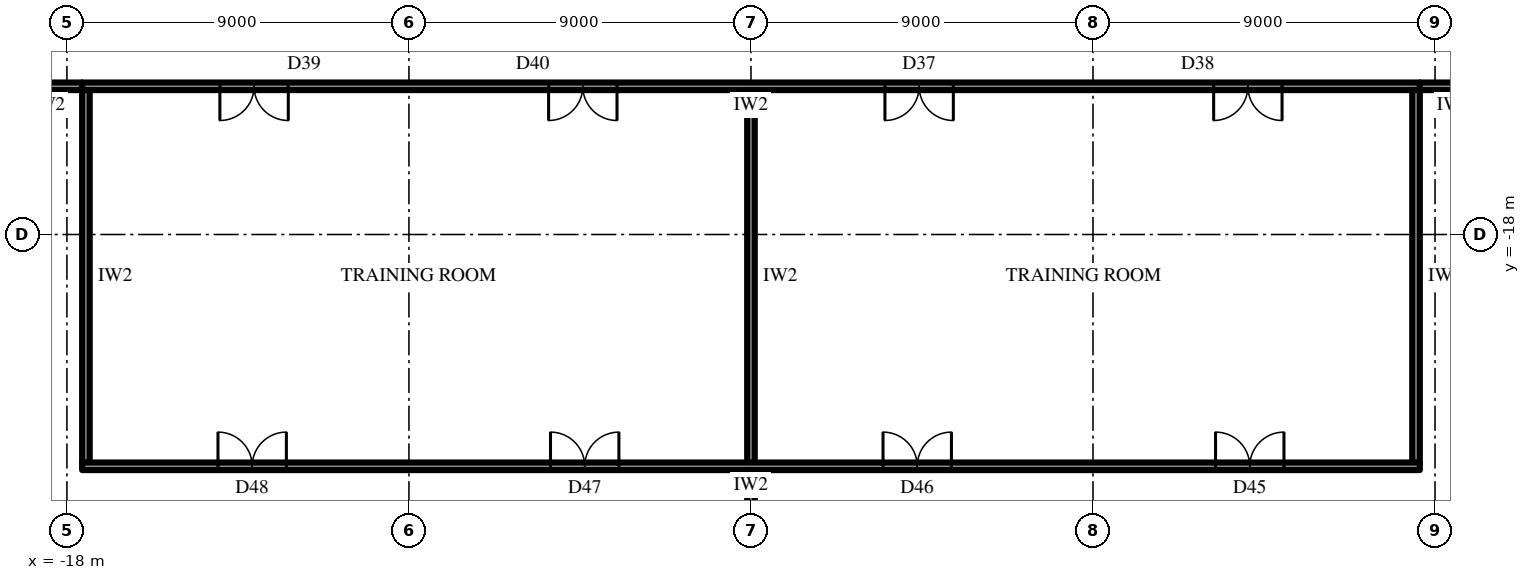
"""IFC4 building model, lengths in metres.
Left out: names, types, materials, properties, quantities, classifications, styles, units other than length and angle.
Written with IfcOpenShell. Run it as: python <this file> out.ifc"""

import sys

from ifc_helpers import new_model, si_unit, direction, frame, frame_2d, origin, place, context, subcontext, project, spatial, rectangle, extrude, element, fill, save


model = new_model("IFC4")
c1 = context("Model", 3, precision=1e-05, world=origin(), true_north=direction((0.0, 1.0)))
c2 = subcontext(c1, "Body", "Model", "MODEL_VIEW")
j1 = project(units=[si_unit("LENGTHUNIT", "METRE"), si_unit("PLANEANGLEUNIT", "RADIAN")], contexts=[c1])
p1 = place(None, origin())
s1 = spatial("IfcSite", under=j1, at=p1, CompositionType="ELEMENT")
p2 = place(p1, origin())
s2 = spatial("IfcBuilding", under=s1, at=p2, CompositionType="ELEMENT")
p3 = place(p2, frame((0.0, 0.0, 13.0)))
s3 = spatial("IfcBuildingStorey", under=s2, at=p3, CompositionType="ELEMENT", Elevation=13.0)
p4 = place(p3, frame((17.6, -14.1, 0.0), z_axis=(0.0, 0.0, 1.0), x_axis=(-1.0, 0.0, 0.0)))
e1 = element("IfcWall", 1, at=p4, inside=s3, PredefinedType="PARTITIONING", context=c2, shape_type="SweptSolid", body=[
    extrude(rectangle(XDim=35.2, YDim=0.2, at=frame_2d((17.6, 0.0))), origin(), (0.0, 0.0, 1.0), 5.15),
])
p5 = place(p4, frame((12.275, 0.0, 0.0)))
e2 = element("IfcOpeningElement", 2, at=p5, cuts=e1, PredefinedType="OPENING", context=c2, shape_type="SweptSolid", body=[
    extrude(rectangle(XDim=1.8, YDim=2.4, at=frame_2d((0.9, 1.2))), frame((0.0, 0.11, 0.0), z_axis=(0.0, -1.0, 0.0), x_axis=(1.0, 0.0, 0.0)), (0.0, 0.0, 1.0), 0.22),
])
p6 = place(p4, frame((3.625, 0.0, 0.0)))
e3 = element("IfcOpeningElement", 3, at=p6, cuts=e1, PredefinedType="OPENING", context=c2, shape_type="SweptSolid", body=[
    extrude(rectangle(XDim=1.8, YDim=2.4, at=frame_2d((0.9, 1.2))), frame((0.0, 0.11, 0.0), z_axis=(0.0, -1.0, 0.0), x_axis=(1.0, 0.0, 0.0)), (0.0, 0.0, 1.0), 0.22),
])
p7 = place(p4, frame((29.775, 0.0, 0.0)))
e4 = element("IfcOpeningElement", 4, at=p7, cuts=e1, PredefinedType="OPENING", context=c2, shape_type="SweptSolid", body=[
    extrude(rectangle(XDim=1.8, YDim=2.4, at=frame_2d((0.9, 1.2))), frame((0.0, 0.11, 0.0), z_axis=(0.0, -1.0, 0.0), x_axis=(1.0, 0.0, 0.0)), (0.0, 0.0, 1.0), 0.22),
])
p8 = place(p4, frame((21.125, 0.0, 0.0)))
e5 = element("IfcOpeningElement", 5, at=p8, cuts=e1, PredefinedType="OPENING", context=c2, shape_type="SweptSolid", body=[
    extrude(rectangle(XDim=1.8, YDim=2.4, at=frame_2d((0.9, 1.2))), frame((0.0, 0.11, 0.0), z_axis=(0.0, -1.0, 0.0), x_axis=(1.0, 0.0, 0.0)), (0.0, 0.0, 1.0), 0.22),
])
p9 = place(p3, frame((17.5, -14.2, 0.0), z_axis=(0.0, 0.0, 1.0), x_axis=(0.0, -1.0, 0.0)))
e6 = element("IfcWall", 6, at=p9, inside=s3, PredefinedType="PARTITIONING", context=c2, shape_type="SweptSolid", body=[
    extrude(rectangle(XDim=9.8, YDim=0.2, at=frame_2d((4.9, 0.0))), origin(), (0.0, 0.0, 1.0), 5.15),
])
p10 = place(p3, frame((0.0, -14.2, 0.0), z_axis=(0.0, 0.0, 1.0), x_axis=(0.0, -1.0, 0.0)))
e7 = element("IfcWall", 7, at=p10, inside=s3, PredefinedType="PARTITIONING", context=c2, shape_type="SweptSolid", body=[
    extrude(rectangle(XDim=9.8, YDim=0.2, at=frame_2d((4.9, 0.0))), origin(), (0.0, 0.0, 1.0), 4.094),
])
p11 = place(p3, frame((-17.5, -14.2, 0.0), z_axis=(0.0, 0.0, 1.0), x_axis=(0.0, -1.0, 0.0)))
e8 = element("IfcWall", 8, at=p11, inside=s3, PredefinedType="PARTITIONING", context=c2, shape_type="SweptSolid", body=[
    extrude(rectangle(XDim=9.8, YDim=0.2, at=frame_2d((4.9, 0.0))), origin(), (0.0, 0.0, 1.0), 5.15),
])
p12 = place(p3, frame((17.6, -24.1, 0.0), z_axis=(0.0, 0.0, 1.0), x_axis=(-1.0, 0.0, 0.0)))
e9 = element("IfcWall", 9, at=p12, inside=s3, PredefinedType="PARTITIONING", context=c2, shape_type="SweptSolid", body=[
    extrude(rectangle(XDim=35.2, YDim=0.2, at=frame_2d((17.6, 0.0))), origin(), (0.0, 0.0, 1.0), 5.15),
])
p13 = place(p12, frame((3.575, 0.0, 0.0)))
e10 = element("IfcOpeningElement", 10, at=p13, cuts=e9, PredefinedType="OPENING", context=c2, shape_type="SweptSolid", body=[
    extrude(rectangle(XDim=1.8, YDim=2.4, at=frame_2d((0.9, 1.2))), frame((0.0, 0.11, 0.0), z_axis=(0.0, -1.0, 0.0), x_axis=(1.0, 0.0, 0.0)), (0.0, 0.0, 1.0), 0.22),
])
p14 = place(p12, frame((12.325, 0.0, 0.0)))
e11 = element("IfcOpeningElement", 11, at=p14, cuts=e9, PredefinedType="OPENING", context=c2, shape_type="SweptSolid", body=[
    extrude(rectangle(XDim=1.8, YDim=2.4, at=frame_2d((0.9, 1.2))), frame((0.0, 0.11, 0.0), z_axis=(0.0, -1.0, 0.0), x_axis=(1.0, 0.0, 0.0)), (0.0, 0.0, 1.0), 0.22),
])
p15 = place(p12, frame((21.075, 0.0, 0.0)))
e12 = element("IfcOpeningElement", 12, at=p15, cuts=e9, PredefinedType="OPENING", context=c2, shape_type="SweptSolid", body=[
    extrude(rectangle(XDim=1.8, YDim=2.4, at=frame_2d((0.9, 1.2))), frame((0.0, 0.11, 0.0), z_axis=(0.0, -1.0, 0.0), x_axis=(1.0, 0.0, 0.0)), (0.0, 0.0, 1.0), 0.22),
])
p16 = place(p12, frame((29.825, 0.0, 0.0)))
e13 = element("IfcOpeningElement", 13, at=p16, cuts=e9, PredefinedType="OPENING", context=c2, shape_type="SweptSolid", body=[
    extrude(rectangle(XDim=1.8, YDim=2.4, at=frame_2d((0.9, 1.2))), frame((0.0, 0.11, 0.0), z_axis=(0.0, -1.0, 0.0), x_axis=(1.0, 0.0, 0.0)), (0.0, 0.0, 1.0), 0.22),
])
for number, where, z_axis, x_axis in (
    (14, (-17.6, -14.1, 0.0), (0.0, 0.0, 1.0), (-1.0, 0.0, 0.0)),
    (15, (19.4, -14.1, 0.0), (0.0, 0.0, 1.0), (-1.0, 0.0, 0.0)),
):
    element("IfcWall", number, at=place(p3, frame(where, z_axis=z_axis, x_axis=x_axis)), inside=s3, PredefinedType="PARTITIONING", context=c2, shape_type="SweptSolid", body=[
        extrude(rectangle(XDim=1.8, YDim=0.2, at=frame_2d((0.9, 0.0))), origin(), (0.0, 0.0, 1.0), 5.15),
    ])
p17 = place(p3, frame((0.0, -24.2, 0.0), z_axis=(0.0, 0.0, 1.0), x_axis=(0.0, -1.0, 0.0)))
e16 = element("IfcWall", 16, at=p17, inside=s3, PredefinedType="PARTITIONING", context=c2, shape_type="SweptSolid", body=[
    extrude(rectangle(XDim=9.52, YDim=0.2, at=frame_2d((4.76, 0.0))), origin(), (0.0, 0.0, 1.0), 4.094),
])
p18 = place(p13, frame((1.8, 0.0, 0.0), z_axis=(0.0, 0.0, 1.0), x_axis=(-1.0, 0.0, 0.0)))
e17 = element("IfcDoor", 17, at=p18, inside=s3, OperationType="DOUBLE_DOOR_SINGLE_SWING", PredefinedType="DOOR", context=c2, shape_type="SweptSolid", body=[
    extrude(rectangle(XDim=1.8, YDim=2.4, at=frame_2d((0.9, 1.2))), frame((0.0, 0.025, 0.0), z_axis=(0.0, -1.0, 0.0), x_axis=(1.0, 0.0, 0.0)), (0.0, 0.0, 1.0), 0.05),
])
fill(e10, e17)
p19 = place(p14, frame((1.8, 0.0, 0.0), z_axis=(0.0, 0.0, 1.0), x_axis=(-1.0, 0.0, 0.0)))
e18 = element("IfcDoor", 18, at=p19, inside=s3, OperationType="DOUBLE_DOOR_SINGLE_SWING", PredefinedType="DOOR", context=c2, shape_type="SweptSolid", body=[
    extrude(rectangle(XDim=1.8, YDim=2.4, at=frame_2d((0.9, 1.2))), frame((0.0, 0.025, 0.0), z_axis=(0.0, -1.0, 0.0), x_axis=(1.0, 0.0, 0.0)), (0.0, 0.0, 1.0), 0.05),
])
fill(e11, e18)
p20 = place(p15, frame((1.8, 0.0, 0.0), z_axis=(0.0, 0.0, 1.0), x_axis=(-1.0, 0.0, 0.0)))
e19 = element("IfcDoor", 19, at=p20, inside=s3, OperationType="DOUBLE_DOOR_SINGLE_SWING", PredefinedType="DOOR", context=c2, shape_type="SweptSolid", body=[
    extrude(rectangle(XDim=1.8, YDim=2.4, at=frame_2d((0.9, 1.2))), frame((0.0, 0.025, 0.0), z_axis=(0.0, -1.0, 0.0), x_axis=(1.0, 0.0, 0.0)), (0.0, 0.0, 1.0), 0.05),
])
fill(e12, e19)
p21 = place(p16, frame((1.8, 0.0, 0.0), z_axis=(0.0, 0.0, 1.0), x_axis=(-1.0, 0.0, 0.0)))
e20 = element("IfcDoor", 20, at=p21, inside=s3, OperationType="DOUBLE_DOOR_SINGLE_SWING", PredefinedType="DOOR", context=c2, shape_type="SweptSolid", body=[
    extrude(rectangle(XDim=1.8, YDim=2.4, at=frame_2d((0.9, 1.2))), frame((0.0, 0.025, 0.0), z_axis=(0.0, -1.0, 0.0), x_axis=(1.0, 0.0, 0.0)), (0.0, 0.0, 1.0), 0.05),
])
fill(e13, e20)
p22 = place(p5, origin())
e21 = element("IfcDoor", 21, at=p22, inside=s3, OperationType="DOUBLE_DOOR_SINGLE_SWING", PredefinedType="DOOR", context=c2, shape_type="SweptSolid", body=[
    extrude(rectangle(XDim=1.8, YDim=2.4, at=frame_2d((0.9, 1.2))), frame((0.0, 0.025, 0.0), z_axis=(0.0, -1.0, 0.0), x_axis=(1.0, 0.0, 0.0)), (0.0, 0.0, 1.0), 0.05),
])
fill(e2, e21)
p23 = place(p6, origin())
e22 = element("IfcDoor", 22, at=p23, inside=s3, OperationType="DOUBLE_DOOR_SINGLE_SWING", PredefinedType="DOOR", context=c2, shape_type="SweptSolid", body=[
    extrude(rectangle(XDim=1.8, YDim=2.4, at=frame_2d((0.9, 1.2))), frame((0.0, 0.025, 0.0), z_axis=(0.0, -1.0, 0.0), x_axis=(1.0, 0.0, 0.0)), (0.0, 0.0, 1.0), 0.05),
])
fill(e3, e22)
p24 = place(p7, origin())
e23 = element("IfcDoor", 23, at=p24, inside=s3, OperationType="DOUBLE_DOOR_SINGLE_SWING", PredefinedType="DOOR", context=c2, shape_type="SweptSolid", body=[
    extrude(rectangle(XDim=1.8, YDim=2.4, at=frame_2d((0.9, 1.2))), frame((0.0, 0.025, 0.0), z_axis=(0.0, -1.0, 0.0), x_axis=(1.0, 0.0, 0.0)), (0.0, 0.0, 1.0), 0.05),
])
fill(e4, e23)
p25 = place(p8, origin())
e24 = element("IfcDoor", 24, at=p25, inside=s3, OperationType="DOUBLE_DOOR_SINGLE_SWING", PredefinedType="DOOR", context=c2, shape_type="SweptSolid", body=[
    extrude(rectangle(XDim=1.8, YDim=2.4, at=frame_2d((0.9, 1.2))), frame((0.0, 0.025, 0.0), z_axis=(0.0, -1.0, 0.0), x_axis=(1.0, 0.0, 0.0)), (0.0, 0.0, 1.0), 0.05),
])
fill(e5, e24)
save(model, sys.argv[1])
